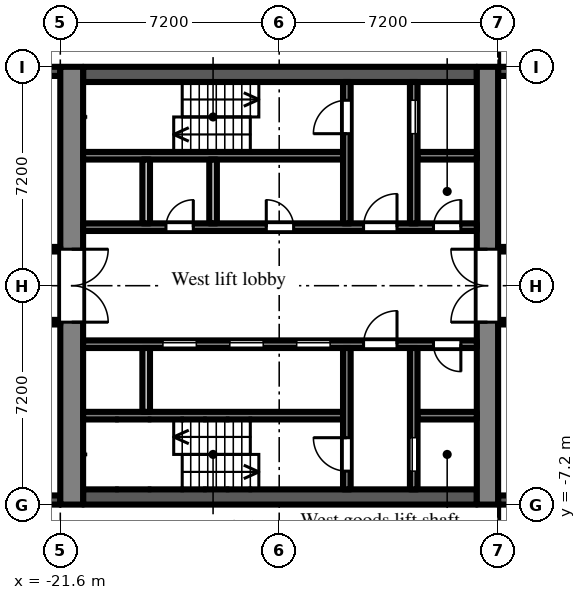
"""IFC4 building model, lengths in metres.
Left out: names, types, materials, properties, quantities, classifications, styles, units other than length and angle.
Written with IfcOpenShell. Run it as: python <this file> out.ifc"""

import sys

from ifc_helpers import new_model, si_unit, direction, frame, frame_2d, origin, place, context, subcontext, project, spatial, rectangle, extrude, element, fill, save


model = new_model("IFC4")
c1 = context("Model", 3, precision=1e-05, world=origin(), true_north=direction((0.0, 1.0)))
c2 = subcontext(c1, "Body", "Model", "MODEL_VIEW")
j1 = project(units=[si_unit("LENGTHUNIT", "METRE"), si_unit("PLANEANGLEUNIT", "RADIAN")], contexts=[c1])
p1 = place(None, origin())
s1 = spatial("IfcSite", under=j1, at=p1, CompositionType="ELEMENT")
p2 = place(p1, origin())
s2 = spatial("IfcBuilding", under=s1, at=p2, CompositionType="ELEMENT")
p3 = place(p2, frame((0.0, 0.0, 29.7)))
s3 = spatial("IfcBuildingStorey", under=s2, at=p3, CompositionType="ELEMENT", Elevation=29.7)
p4 = place(p3, frame((-4.2, 7.05, 0.0), z_axis=(0.0, 0.0, 1.0), x_axis=(-1.0, 0.0, 0.0)))
e1 = element("IfcWall", 1, at=p4, inside=s3, PredefinedType="SOLIDWALL", context=c2, shape_type="SweptSolid", body=[
    extrude(rectangle(XDim=3.0, YDim=0.3, at=frame_2d((1.5, 0.0))), origin(), (0.0, 0.0, 1.0), 2.1),
])
p5 = place(p3, frame((-21.6, 7.05, 0.0), z_axis=(0.0, 0.0, 1.0), x_axis=(-1.0, 0.0, 0.0)))
e2 = element("IfcWall", 2, at=p5, inside=s3, PredefinedType="SOLIDWALL", context=c2, shape_type="SweptSolid", body=[
    extrude(rectangle(XDim=2.7, YDim=0.3, at=frame_2d((1.35, 0.0))), origin(), (0.0, 0.0, 1.0), 2.1),
])
p6 = place(p3, frame((-24.3, -7.05, 0.0), z_axis=(0.0, 0.0, 1.0), x_axis=(1.0, 0.0, 0.0)))
e3 = element("IfcWall", 3, at=p6, inside=s3, PredefinedType="SOLIDWALL", context=c2, shape_type="SweptSolid", body=[
    extrude(rectangle(XDim=2.7, YDim=0.3, at=frame_2d((1.35, 0.0))), origin(), (0.0, 0.0, 1.0), 2.1),
])
p7 = place(p6, frame((0.75, 0.0, 0.2)))
e4 = element("IfcOpeningElement", 4, at=p7, cuts=e3, PredefinedType="OPENING", context=c2, shape_type="SweptSolid", body=[
    extrude(rectangle(XDim=1.2, YDim=1.85, at=frame_2d((0.6, 0.925))), frame((0.0, 0.16, 0.0), z_axis=(0.0, -1.0, 0.0), x_axis=(1.0, 0.0, 0.0)), (0.0, 0.0, 1.0), 0.32),
])
p8 = place(p3, frame((-7.2, -7.05, 0.0), z_axis=(0.0, 0.0, 1.0), x_axis=(1.0, 0.0, 0.0)))
e5 = element("IfcWall", 5, at=p8, inside=s3, PredefinedType="SOLIDWALL", context=c2, shape_type="SweptSolid", body=[
    extrude(rectangle(XDim=3.0, YDim=0.3, at=frame_2d((1.5, 0.0))), origin(), (0.0, 0.0, 1.0), 2.1),
])
p9 = place(p3, frame((-7.55, -7.2, 0.0), z_axis=(0.0, 0.0, 1.0), x_axis=(0.0, 1.0, 0.0)))
e6 = element("IfcWall", 6, at=p9, inside=s3, PredefinedType="SHEAR", context=c2, shape_type="SweptSolid", body=[
    extrude(rectangle(XDim=14.4, YDim=0.7, at=frame_2d((7.2, 0.0))), origin(), (0.0, 0.0, 1.0), 2.575),
])
p10 = place(p9, frame((6.0, 0.0, 0.0)))
e7 = element("IfcOpeningElement", 7, at=p10, cuts=e6, PredefinedType="OPENING", context=c2, shape_type="SweptSolid", body=[
    extrude(rectangle(XDim=2.4, YDim=2.2, at=frame_2d((1.2, 1.1))), frame((0.0, 0.36, 0.0), z_axis=(0.0, -1.0, 0.0), x_axis=(1.0, 0.0, 0.0)), (0.0, 0.0, 1.0), 0.72),
])
p11 = place(p3, frame((-21.225, -7.2, 0.0), z_axis=(0.0, 0.0, 1.0), x_axis=(0.0, 1.0, 0.0)))
e8 = element("IfcWall", 8, at=p11, inside=s3, PredefinedType="SHEAR", context=c2, shape_type="SweptSolid", body=[
    extrude(rectangle(XDim=14.4, YDim=0.75, at=frame_2d((7.2, 0.0))), origin(), (0.0, 0.0, 1.0), 2.575),
])
p12 = place(p11, frame((6.0, 0.0, 0.0)))
e9 = element("IfcOpeningElement", 9, at=p12, cuts=e8, PredefinedType="OPENING", context=c2, shape_type="SweptSolid", body=[
    extrude(rectangle(XDim=2.4, YDim=2.2, at=frame_2d((1.2, 1.1))), frame((0.0, 0.385, 0.0), z_axis=(0.0, -1.0, 0.0), x_axis=(1.0, 0.0, 0.0)), (0.0, 0.0, 1.0), 0.77),
])
p13 = place(p3, frame((-7.9, 6.95, 0.0), z_axis=(0.0, 0.0, 1.0), x_axis=(-1.0, 0.0, 0.0)))
e10 = element("IfcWall", 10, at=p13, inside=s3, PredefinedType="SHEAR", context=c2, shape_type="SweptSolid", body=[
    extrude(rectangle(XDim=12.95, YDim=0.5, at=frame_2d((6.475, 0.0))), origin(), (0.0, 0.0, 1.0), 2.575),
])
p14 = place(p3, frame((-7.9, 1.925, 0.0), z_axis=(0.0, 0.0, 1.0), x_axis=(-1.0, 0.0, 0.0)))
e11 = element("IfcWall", 11, at=p14, inside=s3, PredefinedType="SHEAR", context=c2, shape_type="SweptSolid", body=[
    extrude(rectangle(XDim=12.95, YDim=0.25, at=frame_2d((6.475, 0.0))), origin(), (0.0, 0.0, 1.0), 2.575),
])
p15 = place(p14, frame((0.525, 0.0, 0.0)))
e12 = element("IfcOpeningElement", 12, at=p15, cuts=e11, PredefinedType="OPENING", context=c2, shape_type="SweptSolid", body=[
    extrude(rectangle(XDim=0.9, YDim=2.1, at=frame_2d((0.45, 1.05))), frame((0.0, 0.135, 0.0), z_axis=(0.0, -1.0, 0.0), x_axis=(1.0, 0.0, 0.0)), (0.0, 0.0, 1.0), 0.27),
])
p16 = place(p14, frame((2.625, 0.0, 0.0)))
e13 = element("IfcOpeningElement", 13, at=p16, cuts=e11, PredefinedType="OPENING", context=c2, shape_type="SweptSolid", body=[
    extrude(rectangle(XDim=1.1, YDim=2.1, at=frame_2d((0.55, 1.05))), frame((0.0, 0.135, 0.0), z_axis=(0.0, -1.0, 0.0), x_axis=(1.0, 0.0, 0.0)), (0.0, 0.0, 1.0), 0.27),
])
p17 = place(p14, frame((6.025, 0.0, 0.0)))
e14 = element("IfcOpeningElement", 14, at=p17, cuts=e11, PredefinedType="OPENING", context=c2, shape_type="SweptSolid", body=[
    extrude(rectangle(XDim=0.9, YDim=2.1, at=frame_2d((0.45, 1.05))), frame((0.0, 0.135, 0.0), z_axis=(0.0, -1.0, 0.0), x_axis=(1.0, 0.0, 0.0)), (0.0, 0.0, 1.0), 0.27),
])
p18 = place(p14, frame((9.325, 0.0, 0.0)))
e15 = element("IfcOpeningElement", 15, at=p18, cuts=e11, PredefinedType="OPENING", context=c2, shape_type="SweptSolid", body=[
    extrude(rectangle(XDim=0.9, YDim=2.1, at=frame_2d((0.45, 1.05))), frame((0.0, 0.135, 0.0), z_axis=(0.0, -1.0, 0.0), x_axis=(1.0, 0.0, 0.0)), (0.0, 0.0, 1.0), 0.27),
])
p19 = place(p3, frame((-7.9, 4.275, 0.0), z_axis=(0.0, 0.0, 1.0), x_axis=(-1.0, 0.0, 0.0)))
e16 = element("IfcWall", 16, at=p19, inside=s3, PredefinedType="SHEAR", context=c2, shape_type="SweptSolid", body=[
    extrude(rectangle(XDim=1.95, YDim=0.25, at=frame_2d((0.975, 0.0))), origin(), (0.0, 0.0, 1.0), 2.575),
])
p20 = place(p3, frame((-12.3, 4.275, 0.0), z_axis=(0.0, 0.0, 1.0), x_axis=(-1.0, 0.0, 0.0)))
e17 = element("IfcWall", 17, at=p20, inside=s3, PredefinedType="SHEAR", context=c2, shape_type="SweptSolid", body=[
    extrude(rectangle(XDim=8.55, YDim=0.25, at=frame_2d((4.275, 0.0))), origin(), (0.0, 0.0, 1.0), 2.575),
])
p21 = place(p3, frame((-9.975, 2.05, 0.0), z_axis=(0.0, 0.0, 1.0), x_axis=(0.0, 1.0, 0.0)))
e18 = element("IfcWall", 18, at=p21, inside=s3, PredefinedType="SHEAR", context=c2, shape_type="SweptSolid", body=[
    extrude(rectangle(XDim=4.65, YDim=0.25, at=frame_2d((2.325, 0.0))), origin(), (0.0, 0.0, 1.0), 2.575),
])
p22 = place(p21, frame((2.95, 0.0, 0.0)))
e19 = element("IfcOpeningElement", 19, at=p22, cuts=e18, PredefinedType="OPENING", context=c2, shape_type="SweptSolid", body=[
    extrude(rectangle(XDim=1.1, YDim=2.1, at=frame_2d((0.55, 1.05))), frame((0.0, 0.135, 0.0), z_axis=(0.0, -1.0, 0.0), x_axis=(1.0, 0.0, 0.0)), (0.0, 0.0, 1.0), 0.27),
])
p23 = place(p3, frame((-12.175, 2.05, 0.0), z_axis=(0.0, 0.0, 1.0), x_axis=(0.0, 1.0, 0.0)))
e20 = element("IfcWall", 20, at=p23, inside=s3, PredefinedType="SHEAR", context=c2, shape_type="SweptSolid", body=[
    extrude(rectangle(XDim=4.65, YDim=0.25, at=frame_2d((2.325, 0.0))), origin(), (0.0, 0.0, 1.0), 2.575),
])
p24 = place(p23, frame((2.95, 0.0, 0.0)))
e21 = element("IfcOpeningElement", 21, at=p24, cuts=e20, PredefinedType="OPENING", context=c2, shape_type="SweptSolid", body=[
    extrude(rectangle(XDim=1.1, YDim=2.1, at=frame_2d((0.55, 1.05))), frame((0.0, 0.135, 0.0), z_axis=(0.0, -1.0, 0.0), x_axis=(1.0, 0.0, 0.0)), (0.0, 0.0, 1.0), 0.27),
])
for number, where, z_axis, x_axis in (
    (22, (-16.575, 2.05, 0.0), (0.0, 0.0, 1.0), (0.0, 1.0, 0.0)),
    (23, (-18.775, 2.05, 0.0), (0.0, 0.0, 1.0), (0.0, 1.0, 0.0)),
):
    element("IfcWall", number, at=place(p3, frame(where, z_axis=z_axis, x_axis=x_axis)), inside=s3, PredefinedType="PARTITIONING", context=c2, shape_type="SweptSolid", body=[
        extrude(rectangle(XDim=2.1, YDim=0.25, at=frame_2d((1.05, 0.0))), origin(), (0.0, 0.0, 1.0), 2.575),
    ])
p25 = place(p3, frame((-7.9, -6.95, 0.0), z_axis=(0.0, 0.0, 1.0), x_axis=(-1.0, 0.0, 0.0)))
e24 = element("IfcWall", 24, at=p25, inside=s3, PredefinedType="SHEAR", context=c2, shape_type="SweptSolid", body=[
    extrude(rectangle(XDim=12.95, YDim=0.5, at=frame_2d((6.475, 0.0))), origin(), (0.0, 0.0, 1.0), 2.575),
])
p26 = place(p3, frame((-7.9, -1.925, 0.0), z_axis=(0.0, 0.0, 1.0), x_axis=(-1.0, 0.0, 0.0)))
e25 = element("IfcWall", 25, at=p26, inside=s3, PredefinedType="SHEAR", context=c2, shape_type="SweptSolid", body=[
    extrude(rectangle(XDim=12.95, YDim=0.25, at=frame_2d((6.475, 0.0))), origin(), (0.0, 0.0, 1.0), 2.575),
])
p27 = place(p26, frame((4.825, 0.0, 0.0)))
e26 = element("IfcOpeningElement", 26, at=p27, cuts=e25, PredefinedType="OPENING", context=c2, shape_type="SweptSolid", body=[
    extrude(rectangle(XDim=1.1, YDim=2.1, at=frame_2d((0.55, 1.05))), frame((0.0, 0.135, 0.0), z_axis=(0.0, -1.0, 0.0), x_axis=(1.0, 0.0, 0.0)), (0.0, 0.0, 1.0), 0.27),
])
p28 = place(p26, frame((7.025, 0.0, 0.0)))
e27 = element("IfcOpeningElement", 27, at=p28, cuts=e25, PredefinedType="OPENING", context=c2, shape_type="SweptSolid", body=[
    extrude(rectangle(XDim=1.1, YDim=2.1, at=frame_2d((0.55, 1.05))), frame((0.0, 0.135, 0.0), z_axis=(0.0, -1.0, 0.0), x_axis=(1.0, 0.0, 0.0)), (0.0, 0.0, 1.0), 0.27),
])
p29 = place(p26, frame((9.225, 0.0, 0.0)))
e28 = element("IfcOpeningElement", 28, at=p29, cuts=e25, PredefinedType="OPENING", context=c2, shape_type="SweptSolid", body=[
    extrude(rectangle(XDim=1.1, YDim=2.1, at=frame_2d((0.55, 1.05))), frame((0.0, 0.135, 0.0), z_axis=(0.0, -1.0, 0.0), x_axis=(1.0, 0.0, 0.0)), (0.0, 0.0, 1.0), 0.27),
])
p30 = place(p26, frame((0.525, 0.0, 0.0)))
e29 = element("IfcOpeningElement", 29, at=p30, cuts=e25, PredefinedType="OPENING", context=c2, shape_type="SweptSolid", body=[
    extrude(rectangle(XDim=0.9, YDim=2.1, at=frame_2d((0.45, 1.05))), frame((0.0, 0.135, 0.0), z_axis=(0.0, -1.0, 0.0), x_axis=(1.0, 0.0, 0.0)), (0.0, 0.0, 1.0), 0.27),
])
p31 = place(p26, frame((2.625, 0.0, 0.0)))
e30 = element("IfcOpeningElement", 30, at=p31, cuts=e25, PredefinedType="OPENING", context=c2, shape_type="SweptSolid", body=[
    extrude(rectangle(XDim=1.1, YDim=2.1, at=frame_2d((0.55, 1.05))), frame((0.0, 0.135, 0.0), z_axis=(0.0, -1.0, 0.0), x_axis=(1.0, 0.0, 0.0)), (0.0, 0.0, 1.0), 0.27),
])
p32 = place(p3, frame((-7.9, -4.275, 0.0), z_axis=(0.0, 0.0, 1.0), x_axis=(-1.0, 0.0, 0.0)))
e31 = element("IfcWall", 31, at=p32, inside=s3, PredefinedType="SHEAR", context=c2, shape_type="SweptSolid", body=[
    extrude(rectangle(XDim=1.95, YDim=0.25, at=frame_2d((0.975, 0.0))), origin(), (0.0, 0.0, 1.0), 2.575),
])
p33 = place(p3, frame((-12.3, -4.275, 0.0), z_axis=(0.0, 0.0, 1.0), x_axis=(-1.0, 0.0, 0.0)))
e32 = element("IfcWall", 32, at=p33, inside=s3, PredefinedType="SHEAR", context=c2, shape_type="SweptSolid", body=[
    extrude(rectangle(XDim=8.55, YDim=0.25, at=frame_2d((4.275, 0.0))), origin(), (0.0, 0.0, 1.0), 2.575),
])
p34 = place(p3, frame((-9.975, -2.05, 0.0), z_axis=(0.0, 0.0, 1.0), x_axis=(0.0, -1.0, 0.0)))
e33 = element("IfcWall", 33, at=p34, inside=s3, PredefinedType="SHEAR", context=c2, shape_type="SweptSolid", body=[
    extrude(rectangle(XDim=4.65, YDim=0.25, at=frame_2d((2.325, 0.0))), origin(), (0.0, 0.0, 1.0), 2.575),
])
p35 = place(p34, frame((2.95, 0.0, 0.0)))
e34 = element("IfcOpeningElement", 34, at=p35, cuts=e33, PredefinedType="OPENING", context=c2, shape_type="SweptSolid", body=[
    extrude(rectangle(XDim=1.1, YDim=2.1, at=frame_2d((0.55, 1.05))), frame((0.0, 0.135, 0.0), z_axis=(0.0, -1.0, 0.0), x_axis=(1.0, 0.0, 0.0)), (0.0, 0.0, 1.0), 0.27),
])
p36 = place(p3, frame((-12.175, -2.05, 0.0), z_axis=(0.0, 0.0, 1.0), x_axis=(0.0, -1.0, 0.0)))
e35 = element("IfcWall", 35, at=p36, inside=s3, PredefinedType="SHEAR", context=c2, shape_type="SweptSolid", body=[
    extrude(rectangle(XDim=4.65, YDim=0.25, at=frame_2d((2.325, 0.0))), origin(), (0.0, 0.0, 1.0), 2.575),
])
p37 = place(p36, frame((2.95, 0.0, 0.0)))
e36 = element("IfcOpeningElement", 36, at=p37, cuts=e35, PredefinedType="OPENING", context=c2, shape_type="SweptSolid", body=[
    extrude(rectangle(XDim=1.1, YDim=2.1, at=frame_2d((0.55, 1.05))), frame((0.0, 0.135, 0.0), z_axis=(0.0, -1.0, 0.0), x_axis=(1.0, 0.0, 0.0)), (0.0, 0.0, 1.0), 0.27),
])
p38 = place(p3, frame((-18.775, -2.05, 0.0), z_axis=(0.0, 0.0, 1.0), x_axis=(0.0, -1.0, 0.0)))
e37 = element("IfcWall", 37, at=p38, inside=s3, PredefinedType="PARTITIONING", context=c2, shape_type="SweptSolid", body=[
    extrude(rectangle(XDim=2.1, YDim=0.25, at=frame_2d((1.05, 0.0))), origin(), (0.0, 0.0, 1.0), 2.575),
])
p39 = place(p3, frame((-36.5, -1.2, 0.0), z_axis=(0.0, 0.0, 1.0), x_axis=(1.0, 0.0, 0.0)))
e38 = element("IfcWall", 38, at=p39, inside=s3, PredefinedType="PARTITIONING", context=c2, shape_type="SweptSolid", body=[
    extrude(rectangle(XDim=14.9, YDim=0.15, at=frame_2d((7.45, 0.0))), origin(), (0.0, 0.0, 1.0), 2.575),
])
p40 = place(p39, frame((10.4, 0.0, 0.0)))
e39 = element("IfcOpeningElement", 39, at=p40, cuts=e38, PredefinedType="OPENING", context=c2, shape_type="SweptSolid", body=[
    extrude(rectangle(XDim=1.8, YDim=2.1, at=frame_2d((0.9, 1.05))), frame((0.0, 0.085, 0.0), z_axis=(0.0, -1.0, 0.0), x_axis=(1.0, 0.0, 0.0)), (0.0, 0.0, 1.0), 0.17),
])
p41 = place(p39, frame((5.45, 0.0, 0.0)))
e40 = element("IfcOpeningElement", 40, at=p41, cuts=e38, PredefinedType="OPENING", context=c2, shape_type="SweptSolid", body=[
    extrude(rectangle(XDim=0.9, YDim=2.1, at=frame_2d((0.45, 1.05))), frame((0.0, 0.085, 0.0), z_axis=(0.0, -1.0, 0.0), x_axis=(1.0, 0.0, 0.0)), (0.0, 0.0, 1.0), 0.17),
])
p42 = place(p39, frame((1.15, 0.0, 0.0)))
e41 = element("IfcOpeningElement", 41, at=p42, cuts=e38, PredefinedType="OPENING", context=c2, shape_type="SweptSolid", body=[
    extrude(rectangle(XDim=1.8, YDim=2.1, at=frame_2d((0.9, 1.05))), frame((0.0, 0.085, 0.0), z_axis=(0.0, -1.0, 0.0), x_axis=(1.0, 0.0, 0.0)), (0.0, 0.0, 1.0), 0.17),
])
p43 = place(p3, frame((-36.5, 1.2, 0.0), z_axis=(0.0, 0.0, 1.0), x_axis=(1.0, 0.0, 0.0)))
e42 = element("IfcWall", 42, at=p43, inside=s3, PredefinedType="PARTITIONING", context=c2, shape_type="SweptSolid", body=[
    extrude(rectangle(XDim=14.9, YDim=0.15, at=frame_2d((7.45, 0.0))), origin(), (0.0, 0.0, 1.0), 2.575),
])
p44 = place(p43, frame((10.4, 0.0, 0.0)))
e43 = element("IfcOpeningElement", 43, at=p44, cuts=e42, PredefinedType="OPENING", context=c2, shape_type="SweptSolid", body=[
    extrude(rectangle(XDim=1.8, YDim=2.1, at=frame_2d((0.9, 1.05))), frame((0.0, 0.085, 0.0), z_axis=(0.0, -1.0, 0.0), x_axis=(1.0, 0.0, 0.0)), (0.0, 0.0, 1.0), 0.17),
])
p45 = place(p43, frame((5.45, 0.0, 0.0)))
e44 = element("IfcOpeningElement", 44, at=p45, cuts=e42, PredefinedType="OPENING", context=c2, shape_type="SweptSolid", body=[
    extrude(rectangle(XDim=0.9, YDim=2.1, at=frame_2d((0.45, 1.05))), frame((0.0, 0.085, 0.0), z_axis=(0.0, -1.0, 0.0), x_axis=(1.0, 0.0, 0.0)), (0.0, 0.0, 1.0), 0.17),
])
p46 = place(p43, frame((1.15, 0.0, 0.0)))
e45 = element("IfcOpeningElement", 45, at=p46, cuts=e42, PredefinedType="OPENING", context=c2, shape_type="SweptSolid", body=[
    extrude(rectangle(XDim=1.8, YDim=2.1, at=frame_2d((0.9, 1.05))), frame((0.0, 0.085, 0.0), z_axis=(0.0, -1.0, 0.0), x_axis=(1.0, 0.0, 0.0)), (0.0, 0.0, 1.0), 0.17),
])
p47 = place(p3, frame((-7.2, -1.2, 0.0), z_axis=(0.0, 0.0, 1.0), x_axis=(1.0, 0.0, 0.0)))
e46 = element("IfcWall", 46, at=p47, inside=s3, PredefinedType="PARTITIONING", context=c2, shape_type="SweptSolid", body=[
    extrude(rectangle(XDim=5.925, YDim=0.15, at=frame_2d((2.962, 0.0))), origin(), (0.0, 0.0, 1.0), 2.575),
])
p48 = place(p47, frame((1.95, 0.0, 0.0)))
e47 = element("IfcOpeningElement", 47, at=p48, cuts=e46, PredefinedType="OPENING", context=c2, shape_type="SweptSolid", body=[
    extrude(rectangle(XDim=0.9, YDim=2.1, at=frame_2d((0.45, 1.05))), frame((0.0, 0.085, 0.0), z_axis=(0.0, -1.0, 0.0), x_axis=(1.0, 0.0, 0.0)), (0.0, 0.0, 1.0), 0.17),
])
p49 = place(p3, frame((-7.2, 1.2, 0.0), z_axis=(0.0, 0.0, 1.0), x_axis=(1.0, 0.0, 0.0)))
e48 = element("IfcWall", 48, at=p49, inside=s3, PredefinedType="PARTITIONING", context=c2, shape_type="SweptSolid", body=[
    extrude(rectangle(XDim=5.925, YDim=0.15, at=frame_2d((2.962, 0.0))), origin(), (0.0, 0.0, 1.0), 2.575),
])
p50 = place(p49, frame((0.55, 0.0, 0.0)))
e49 = element("IfcOpeningElement", 49, at=p50, cuts=e48, PredefinedType="OPENING", context=c2, shape_type="SweptSolid", body=[
    extrude(rectangle(XDim=0.9, YDim=2.1, at=frame_2d((0.45, 1.05))), frame((0.0, 0.085, 0.0), z_axis=(0.0, -1.0, 0.0), x_axis=(1.0, 0.0, 0.0)), (0.0, 0.0, 1.0), 0.17),
])
p51 = place(p27, origin())
e50 = element("IfcDoor", 50, at=p51, inside=s3, OperationType="SLIDING_TO_LEFT", PredefinedType="DOOR", context=c2, shape_type="SweptSolid", body=[
    extrude(rectangle(XDim=1.1, YDim=2.1, at=frame_2d((0.55, 1.05))), frame((0.0, 0.025, 0.0), z_axis=(0.0, -1.0, 0.0), x_axis=(1.0, 0.0, 0.0)), (0.0, 0.0, 1.0), 0.05),
])
fill(e26, e50)
p52 = place(p28, origin())
e51 = element("IfcDoor", 51, at=p52, inside=s3, OperationType="SLIDING_TO_LEFT", PredefinedType="DOOR", context=c2, shape_type="SweptSolid", body=[
    extrude(rectangle(XDim=1.1, YDim=2.1, at=frame_2d((0.55, 1.05))), frame((0.0, 0.025, 0.0), z_axis=(0.0, -1.0, 0.0), x_axis=(1.0, 0.0, 0.0)), (0.0, 0.0, 1.0), 0.05),
])
fill(e27, e51)
p53 = place(p29, origin())
e52 = element("IfcDoor", 52, at=p53, inside=s3, OperationType="SLIDING_TO_LEFT", PredefinedType="DOOR", context=c2, shape_type="SweptSolid", body=[
    extrude(rectangle(XDim=1.1, YDim=2.1, at=frame_2d((0.55, 1.05))), frame((0.0, 0.025, 0.0), z_axis=(0.0, -1.0, 0.0), x_axis=(1.0, 0.0, 0.0)), (0.0, 0.0, 1.0), 0.05),
])
fill(e28, e52)
p54 = place(p22, origin())
e53 = element("IfcDoor", 53, at=p54, inside=s3, OperationType="SLIDING_TO_LEFT", PredefinedType="DOOR", context=c2, shape_type="SweptSolid", body=[
    extrude(rectangle(XDim=1.1, YDim=2.1, at=frame_2d((0.55, 1.05))), frame((0.0, 0.025, 0.0), z_axis=(0.0, -1.0, 0.0), x_axis=(1.0, 0.0, 0.0)), (0.0, 0.0, 1.0), 0.05),
])
fill(e19, e53)
p55 = place(p35, origin())
e54 = element("IfcDoor", 54, at=p55, inside=s3, OperationType="SLIDING_TO_LEFT", PredefinedType="DOOR", context=c2, shape_type="SweptSolid", body=[
    extrude(rectangle(XDim=1.1, YDim=2.1, at=frame_2d((0.55, 1.05))), frame((0.0, 0.025, 0.0), z_axis=(0.0, -1.0, 0.0), x_axis=(1.0, 0.0, 0.0)), (0.0, 0.0, 1.0), 0.05),
])
fill(e34, e54)
p56 = place(p24, origin())
e55 = element("IfcDoor", 55, at=p56, inside=s3, OperationType="SINGLE_SWING_LEFT", PredefinedType="DOOR", context=c2, shape_type="SweptSolid", body=[
    extrude(rectangle(XDim=1.1, YDim=2.1, at=frame_2d((0.55, 1.05))), frame((0.0, 0.025, 0.0), z_axis=(0.0, -1.0, 0.0), x_axis=(1.0, 0.0, 0.0)), (0.0, 0.0, 1.0), 0.05),
])
fill(e21, e55)
p57 = place(p37, frame((1.1, 0.0, 0.0), z_axis=(0.0, 0.0, 1.0), x_axis=(-1.0, 0.0, 0.0)))
e56 = element("IfcDoor", 56, at=p57, inside=s3, OperationType="SINGLE_SWING_RIGHT", PredefinedType="DOOR", context=c2, shape_type="SweptSolid", body=[
    extrude(rectangle(XDim=1.1, YDim=2.1, at=frame_2d((0.55, 1.05))), frame((0.0, 0.025, 0.0), z_axis=(0.0, -1.0, 0.0), x_axis=(1.0, 0.0, 0.0)), (0.0, 0.0, 1.0), 0.05),
])
fill(e36, e56)
p58 = place(p15, frame((0.9, 0.0, 0.0), z_axis=(0.0, 0.0, 1.0), x_axis=(-1.0, 0.0, 0.0)))
e57 = element("IfcDoor", 57, at=p58, inside=s3, OperationType="SINGLE_SWING_RIGHT", PredefinedType="DOOR", context=c2, shape_type="SweptSolid", body=[
    extrude(rectangle(XDim=0.9, YDim=2.1, at=frame_2d((0.45, 1.05))), frame((0.0, 0.025, 0.0), z_axis=(0.0, -1.0, 0.0), x_axis=(1.0, 0.0, 0.0)), (0.0, 0.0, 1.0), 0.05),
])
fill(e12, e57)
p59 = place(p30, origin())
e58 = element("IfcDoor", 58, at=p59, inside=s3, OperationType="SINGLE_SWING_LEFT", PredefinedType="DOOR", context=c2, shape_type="SweptSolid", body=[
    extrude(rectangle(XDim=0.9, YDim=2.1, at=frame_2d((0.45, 1.05))), frame((0.0, 0.025, 0.0), z_axis=(0.0, -1.0, 0.0), x_axis=(1.0, 0.0, 0.0)), (0.0, 0.0, 1.0), 0.05),
])
fill(e29, e58)
p60 = place(p16, frame((1.1, 0.0, 0.0), z_axis=(0.0, 0.0, 1.0), x_axis=(-1.0, 0.0, 0.0)))
e59 = element("IfcDoor", 59, at=p60, inside=s3, OperationType="SINGLE_SWING_RIGHT", PredefinedType="DOOR", context=c2, shape_type="SweptSolid", body=[
    extrude(rectangle(XDim=1.1, YDim=2.1, at=frame_2d((0.55, 1.05))), frame((0.0, 0.025, 0.0), z_axis=(0.0, -1.0, 0.0), x_axis=(1.0, 0.0, 0.0)), (0.0, 0.0, 1.0), 0.05),
])
fill(e13, e59)
p61 = place(p31, frame((1.1, 0.0, 0.0), z_axis=(0.0, 0.0, 1.0), x_axis=(-1.0, 0.0, 0.0)))
e60 = element("IfcDoor", 60, at=p61, inside=s3, OperationType="SINGLE_SWING_RIGHT", PredefinedType="DOOR", context=c2, shape_type="SweptSolid", body=[
    extrude(rectangle(XDim=1.1, YDim=2.1, at=frame_2d((0.55, 1.05))), frame((0.0, 0.025, 0.0), z_axis=(0.0, -1.0, 0.0), x_axis=(1.0, 0.0, 0.0)), (0.0, 0.0, 1.0), 0.05),
])
fill(e30, e60)
p62 = place(p10, origin())
e61 = element("IfcDoor", 61, at=p62, inside=s3, OperationType="DOUBLE_DOOR_DOUBLE_SWING", PredefinedType="DOOR", context=c2, shape_type="SweptSolid", body=[
    extrude(rectangle(XDim=2.4, YDim=2.2, at=frame_2d((1.2, 1.1))), frame((0.0, 0.025, 0.0), z_axis=(0.0, -1.0, 0.0), x_axis=(1.0, 0.0, 0.0)), (0.0, 0.0, 1.0), 0.05),
])
fill(e7, e61)
p63 = place(p12, frame((2.4, 0.0, 0.0), z_axis=(0.0, 0.0, 1.0), x_axis=(-1.0, 0.0, 0.0)))
e62 = element("IfcDoor", 62, at=p63, inside=s3, OperationType="DOUBLE_DOOR_DOUBLE_SWING", PredefinedType="DOOR", context=c2, shape_type="SweptSolid", body=[
    extrude(rectangle(XDim=2.4, YDim=2.2, at=frame_2d((1.2, 1.1))), frame((0.0, 0.025, 0.0), z_axis=(0.0, -1.0, 0.0), x_axis=(1.0, 0.0, 0.0)), (0.0, 0.0, 1.0), 0.05),
])
fill(e9, e62)
p64 = place(p17, frame((0.9, 0.0, 0.0), z_axis=(0.0, 0.0, 1.0), x_axis=(-1.0, 0.0, 0.0)))
e63 = element("IfcDoor", 63, at=p64, inside=s3, OperationType="SINGLE_SWING_LEFT", PredefinedType="DOOR", context=c2, shape_type="SweptSolid", body=[
    extrude(rectangle(XDim=0.9, YDim=2.1, at=frame_2d((0.45, 1.05))), frame((0.0, 0.025, 0.0), z_axis=(0.0, -1.0, 0.0), x_axis=(1.0, 0.0, 0.0)), (0.0, 0.0, 1.0), 0.05),
])
fill(e14, e63)
p65 = place(p18, frame((0.9, 0.0, 0.0), z_axis=(0.0, 0.0, 1.0), x_axis=(-1.0, 0.0, 0.0)))
e64 = element("IfcDoor", 64, at=p65, inside=s3, OperationType="SINGLE_SWING_RIGHT", PredefinedType="DOOR", context=c2, shape_type="SweptSolid", body=[
    extrude(rectangle(XDim=0.9, YDim=2.1, at=frame_2d((0.45, 1.05))), frame((0.0, 0.025, 0.0), z_axis=(0.0, -1.0, 0.0), x_axis=(1.0, 0.0, 0.0)), (0.0, 0.0, 1.0), 0.05),
])
fill(e15, e64)
save(model, sys.argv[1])
